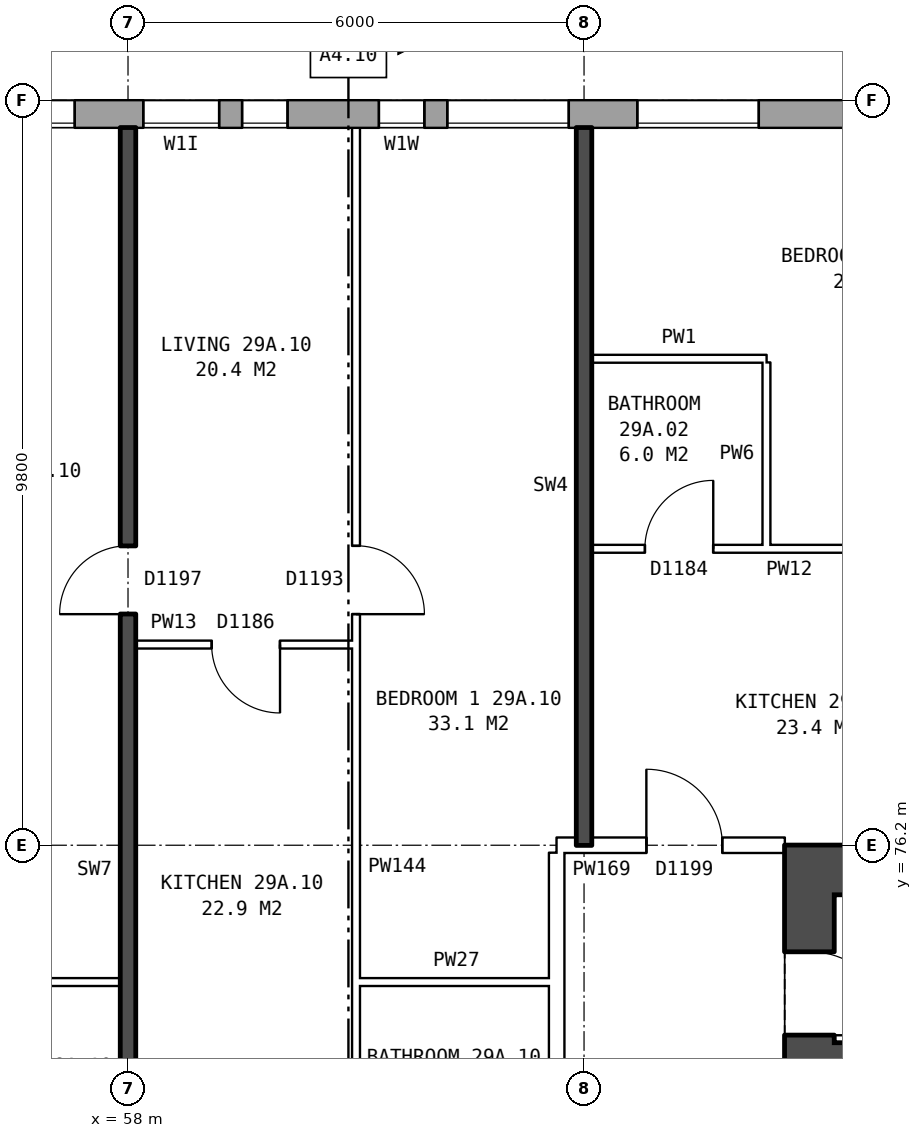
"""IFC4 building model, lengths in metres.
Left out: names, types, materials, properties, quantities, classifications, styles, units other than length and angle.
Written with IfcOpenShell. Run it as: python <this file> out.ifc"""

import sys

from ifc_helpers import new_model, si_unit, direction, frame, frame_2d, origin, place, context, subcontext, project, spatial, rectangle, extrude, element, fill, save


model = new_model("IFC4")
c1 = context("Model", 3, precision=1e-05, world=origin(), true_north=direction((0.0, 1.0)))
c2 = subcontext(c1, "Body", "Model", "MODEL_VIEW")
j1 = project(units=[si_unit("LENGTHUNIT", "METRE"), si_unit("PLANEANGLEUNIT", "RADIAN")], contexts=[c1])
p1 = place(None, origin())
s1 = spatial("IfcSite", under=j1, at=p1, CompositionType="ELEMENT")
p2 = place(p1, origin())
s2 = spatial("IfcBuilding", under=s1, at=p2, CompositionType="ELEMENT")
p3 = place(p2, frame((0.0, 0.0, 105.7)))
s3 = spatial("IfcBuildingStorey", under=s2, at=p3, CompositionType="ELEMENT", Elevation=105.7)
p4 = place(p3, frame((72.925, 85.82, 0.0), z_axis=(0.0, 0.0, 1.0), x_axis=(-1.0, 0.0, 0.0)))
e1 = element("IfcWall", 1, at=p4, inside=s3, PredefinedType="STANDARD", context=c2, shape_type="SweptSolid", body=[
    extrude(rectangle(XDim=44.851, YDim=0.36, at=frame_2d((22.425, 0.0))), origin(), (0.0, 0.0, 1.0), 2.85),
])
p5 = place(p4, frame((0.625, 0.0, 0.8)))
e2 = element("IfcOpeningElement", 2, at=p5, cuts=e1, PredefinedType="OPENING", context=c2, shape_type="SweptSolid", body=[
    extrude(rectangle(XDim=1.6, YDim=1.8, at=frame_2d((0.8, 0.9))), frame((0.0, 0.19, 0.0), z_axis=(0.0, -1.0, 0.0), x_axis=(1.0, 0.0, 0.0)), (0.0, 0.0, 1.0), 0.38),
])
p6 = place(p4, frame((3.625, 0.0, 0.8)))
e3 = element("IfcOpeningElement", 3, at=p6, cuts=e1, PredefinedType="OPENING", context=c2, shape_type="SweptSolid", body=[
    extrude(rectangle(XDim=1.6, YDim=1.8, at=frame_2d((0.8, 0.9))), frame((0.0, 0.19, 0.0), z_axis=(0.0, -1.0, 0.0), x_axis=(1.0, 0.0, 0.0)), (0.0, 0.0, 1.0), 0.38),
])
p7 = place(p4, frame((6.625, 0.0, 0.8)))
e4 = element("IfcOpeningElement", 4, at=p7, cuts=e1, PredefinedType="OPENING", context=c2, shape_type="SweptSolid", body=[
    extrude(rectangle(XDim=1.6, YDim=1.8, at=frame_2d((0.8, 0.9))), frame((0.0, 0.19, 0.0), z_axis=(0.0, -1.0, 0.0), x_axis=(1.0, 0.0, 0.0)), (0.0, 0.0, 1.0), 0.38),
])
p8 = place(p4, frame((9.125, 0.0, 0.8)))
e5 = element("IfcOpeningElement", 5, at=p8, cuts=e1, PredefinedType="OPENING", context=c2, shape_type="SweptSolid", body=[
    extrude(rectangle(XDim=1.6, YDim=1.8, at=frame_2d((0.8, 0.9))), frame((0.0, 0.19, 0.0), z_axis=(0.0, -1.0, 0.0), x_axis=(1.0, 0.0, 0.0)), (0.0, 0.0, 1.0), 0.38),
])
p9 = place(p4, frame((12.825, 0.0, 0.55)))
e6 = element("IfcOpeningElement", 6, at=p9, cuts=e1, PredefinedType="OPENING", context=c2, shape_type="SweptSolid", body=[
    extrude(rectangle(XDim=0.6, YDim=0.9, at=frame_2d((0.3, 0.45))), frame((0.0, 0.19, 0.0), z_axis=(0.0, -1.0, 0.0), x_axis=(1.0, 0.0, 0.0)), (0.0, 0.0, 1.0), 0.38),
])
p10 = place(p4, frame((15.625, 0.0, 0.8)))
e7 = element("IfcOpeningElement", 7, at=p10, cuts=e1, PredefinedType="OPENING", context=c2, shape_type="SweptSolid", body=[
    extrude(rectangle(XDim=1.6, YDim=1.8, at=frame_2d((0.8, 0.9))), frame((0.0, 0.19, 0.0), z_axis=(0.0, -1.0, 0.0), x_axis=(1.0, 0.0, 0.0)), (0.0, 0.0, 1.0), 0.38),
])
p11 = place(p4, frame((18.625, 0.0, 0.8)))
e8 = element("IfcOpeningElement", 8, at=p11, cuts=e1, PredefinedType="OPENING", context=c2, shape_type="SweptSolid", body=[
    extrude(rectangle(XDim=1.6, YDim=1.8, at=frame_2d((0.8, 0.9))), frame((0.0, 0.19, 0.0), z_axis=(0.0, -1.0, 0.0), x_axis=(1.0, 0.0, 0.0)), (0.0, 0.0, 1.0), 0.38),
])
p12 = place(p4, frame((21.625, 0.0, 0.8)))
e9 = element("IfcOpeningElement", 9, at=p12, cuts=e1, PredefinedType="OPENING", context=c2, shape_type="SweptSolid", body=[
    extrude(rectangle(XDim=1.6, YDim=1.8, at=frame_2d((0.8, 0.9))), frame((0.0, 0.19, 0.0), z_axis=(0.0, -1.0, 0.0), x_axis=(1.0, 0.0, 0.0)), (0.0, 0.0, 1.0), 0.38),
])
p13 = place(p4, frame((24.625, 0.0, 0.8)))
e10 = element("IfcOpeningElement", 10, at=p13, cuts=e1, PredefinedType="OPENING", context=c2, shape_type="SweptSolid", body=[
    extrude(rectangle(XDim=1.6, YDim=1.8, at=frame_2d((0.8, 0.9))), frame((0.0, 0.19, 0.0), z_axis=(0.0, -1.0, 0.0), x_axis=(1.0, 0.0, 0.0)), (0.0, 0.0, 1.0), 0.38),
])
p14 = place(p4, frame((27.625, 0.0, 0.8)))
e11 = element("IfcOpeningElement", 11, at=p14, cuts=e1, PredefinedType="OPENING", context=c2, shape_type="SweptSolid", body=[
    extrude(rectangle(XDim=1.6, YDim=1.8, at=frame_2d((0.8, 0.9))), frame((0.0, 0.19, 0.0), z_axis=(0.0, -1.0, 0.0), x_axis=(1.0, 0.0, 0.0)), (0.0, 0.0, 1.0), 0.38),
])
p15 = place(p4, frame((29.525, 0.0, 0.8)))
e12 = element("IfcOpeningElement", 12, at=p15, cuts=e1, PredefinedType="OPENING", context=c2, shape_type="SweptSolid", body=[
    extrude(rectangle(XDim=0.8, YDim=1.8, at=frame_2d((0.4, 0.9))), frame((0.0, 0.19, 0.0), z_axis=(0.0, -1.0, 0.0), x_axis=(1.0, 0.0, 0.0)), (0.0, 0.0, 1.0), 0.38),
])
p16 = place(p4, frame((33.325, 0.0, 1.4)))
e13 = element("IfcOpeningElement", 13, at=p16, cuts=e1, PredefinedType="OPENING", context=c2, shape_type="SweptSolid", body=[
    extrude(rectangle(XDim=1.0, YDim=1.2, at=frame_2d((0.5, 0.6))), frame((0.0, 0.19, 0.0), z_axis=(0.0, -1.0, 0.0), x_axis=(1.0, 0.0, 0.0)), (0.0, 0.0, 1.0), 0.38),
])
p17 = place(p4, frame((36.625, 0.0, 0.8)))
e14 = element("IfcOpeningElement", 14, at=p17, cuts=e1, PredefinedType="OPENING", context=c2, shape_type="SweptSolid", body=[
    extrude(rectangle(XDim=1.6, YDim=1.8, at=frame_2d((0.8, 0.9))), frame((0.0, 0.19, 0.0), z_axis=(0.0, -1.0, 0.0), x_axis=(1.0, 0.0, 0.0)), (0.0, 0.0, 1.0), 0.38),
])
p18 = place(p4, frame((39.625, 0.0, 0.8)))
e15 = element("IfcOpeningElement", 15, at=p18, cuts=e1, PredefinedType="OPENING", context=c2, shape_type="SweptSolid", body=[
    extrude(rectangle(XDim=1.6, YDim=1.8, at=frame_2d((0.8, 0.9))), frame((0.0, 0.19, 0.0), z_axis=(0.0, -1.0, 0.0), x_axis=(1.0, 0.0, 0.0)), (0.0, 0.0, 1.0), 0.38),
])
p19 = place(p4, frame((42.625, 0.0, 0.8)))
e16 = element("IfcOpeningElement", 16, at=p19, cuts=e1, PredefinedType="OPENING", context=c2, shape_type="SweptSolid", body=[
    extrude(rectangle(XDim=1.6, YDim=1.8, at=frame_2d((0.8, 0.9))), frame((0.0, 0.19, 0.0), z_axis=(0.0, -1.0, 0.0), x_axis=(1.0, 0.0, 0.0)), (0.0, 0.0, 1.0), 0.38),
])
p20 = place(p4, frame((11.025, 0.0, 1.5)))
e17 = element("IfcOpeningElement", 17, at=p20, cuts=e1, PredefinedType="OPENING", context=c2, shape_type="SweptSolid", body=[
    extrude(rectangle(XDim=0.6, YDim=0.9, at=frame_2d((0.3, 0.45))), frame((0.0, 0.19, 0.0), z_axis=(0.0, -1.0, 0.0), x_axis=(1.0, 0.0, 0.0)), (0.0, 0.0, 1.0), 0.38),
])
p21 = place(p4, frame((13.725, 0.0, 0.55)))
e18 = element("IfcOpeningElement", 18, at=p21, cuts=e1, PredefinedType="OPENING", context=c2, shape_type="SweptSolid", body=[
    extrude(rectangle(XDim=1.0, YDim=1.5, at=frame_2d((0.5, 0.75))), frame((0.0, 0.19, 0.0), z_axis=(0.0, -1.0, 0.0), x_axis=(1.0, 0.0, 0.0)), (0.0, 0.0, 1.0), 0.38),
])
p22 = place(p4, frame((30.625, 0.0, 0.8)))
e19 = element("IfcOpeningElement", 19, at=p22, cuts=e1, PredefinedType="OPENING", context=c2, shape_type="SweptSolid", body=[
    extrude(rectangle(XDim=1.0, YDim=0.9, at=frame_2d((0.5, 0.45))), frame((0.0, 0.19, 0.0), z_axis=(0.0, -1.0, 0.0), x_axis=(1.0, 0.0, 0.0)), (0.0, 0.0, 1.0), 0.38),
])
p23 = place(p4, frame((34.625, 0.0, 0.8)))
e20 = element("IfcOpeningElement", 20, at=p23, cuts=e1, PredefinedType="OPENING", context=c2, shape_type="SweptSolid", body=[
    extrude(rectangle(XDim=1.4, YDim=1.8, at=frame_2d((0.7, 0.9))), frame((0.0, 0.19, 0.0), z_axis=(0.0, -1.0, 0.0), x_axis=(1.0, 0.0, 0.0)), (0.0, 0.0, 1.0), 0.38),
])
p24 = place(p3, frame((66.965, 64.45, 0.0), z_axis=(0.0, 0.0, 1.0), x_axis=(0.0, 1.0, 0.0)))
e21 = element("IfcWall", 21, at=p24, inside=s3, PredefinedType="SHEAR", context=c2, shape_type="SweptSolid", body=[
    extrude(rectangle(XDim=11.1, YDim=0.65, at=frame_2d((5.55, 0.0))), origin(), (0.0, 0.0, 1.0), 2.85),
])
p25 = place(p24, frame((0.675, 0.0, 0.0)))
e22 = element("IfcOpeningElement", 22, at=p25, cuts=e21, PredefinedType="OPENING", context=c2, shape_type="SweptSolid", body=[
    extrude(rectangle(XDim=1.1, YDim=2.1, at=frame_2d((0.55, 1.05))), frame((0.0, 0.335, 0.0), z_axis=(0.0, -1.0, 0.0), x_axis=(1.0, 0.0, 0.0)), (0.0, 0.0, 1.0), 0.67),
])
p26 = place(p24, frame((9.25, 0.0, 0.0)))
e23 = element("IfcOpeningElement", 23, at=p26, cuts=e21, PredefinedType="OPENING", context=c2, shape_type="SweptSolid", body=[
    extrude(rectangle(XDim=1.1, YDim=2.1, at=frame_2d((0.55, 1.05))), frame((0.0, 0.335, 0.0), z_axis=(0.0, -1.0, 0.0), x_axis=(1.0, 0.0, 0.0)), (0.0, 0.0, 1.0), 0.67),
])
p27 = place(p3, frame((66.64, 75.875, 0.0), z_axis=(0.0, 0.0, 1.0), x_axis=(1.0, 0.0, 0.0)))
e24 = element("IfcWall", 24, at=p27, inside=s3, PredefinedType="SHEAR", context=c2, shape_type="SweptSolid", body=[
    extrude(rectangle(XDim=9.0, YDim=0.65, at=frame_2d((4.5, 0.0))), origin(), (0.0, 0.0, 1.0), 2.85),
])
p28 = place(p3, frame((67.29, 73.45, 0.0), z_axis=(0.0, 0.0, 1.0), x_axis=(1.0, 0.0, 0.0)))
e25 = element("IfcWall", 25, at=p28, inside=s3, PredefinedType="SHEAR", context=c2, shape_type="SweptSolid", body=[
    extrude(rectangle(XDim=2.25, YDim=0.3, at=frame_2d((1.125, 0.0))), origin(), (0.0, 0.0, 1.0), 2.85),
])
p29 = place(p3, frame((63.64, 63.9, 0.0), z_axis=(0.0, 0.0, 1.0), x_axis=(0.0, 1.0, 0.0)))
e26 = element("IfcWall", 26, at=p29, inside=s3, PredefinedType="PARTITIONING", context=c2, shape_type="SweptSolid", body=[
    extrude(rectangle(XDim=12.2, YDim=0.2, at=frame_2d((6.1, 0.0))), origin(), (0.0, 0.0, 1.0), 2.85),
])
p30 = place(p29, frame((5.1, 0.0, 0.0)))
e27 = element("IfcOpeningElement", 27, at=p30, cuts=e26, PredefinedType="OPENING", context=c2, shape_type="SweptSolid", body=[
    extrude(rectangle(XDim=2.0, YDim=2.1, at=frame_2d((1.0, 1.05))), frame((0.0, 0.11, 0.0), z_axis=(0.0, -1.0, 0.0), x_axis=(1.0, 0.0, 0.0)), (0.0, 0.0, 1.0), 0.22),
])
p31 = place(p3, frame((55.1, 74.4, 0.0), z_axis=(0.0, 0.0, 1.0), x_axis=(1.0, 0.0, 0.0)))
e28 = element("IfcWall", 28, at=p31, inside=s3, PredefinedType="PARTITIONING", context=c2, shape_type="SweptSolid", body=[
    extrude(rectangle(XDim=2.8, YDim=0.1, at=frame_2d((1.4, 0.0))), origin(), (0.0, 0.0, 1.0), 2.85),
])
p32 = place(p3, frame((61.0, 74.4, 0.0), z_axis=(0.0, 0.0, 1.0), x_axis=(1.0, 0.0, 0.0)))
e29 = element("IfcWall", 29, at=p32, inside=s3, PredefinedType="PARTITIONING", context=c2, shape_type="SweptSolid", body=[
    extrude(rectangle(XDim=2.64, YDim=0.1, at=frame_2d((1.32, 0.0))), origin(), (0.0, 0.0, 1.0), 2.85),
])
p33 = place(p3, frame((63.64, 76.2, 0.0), z_axis=(0.0, 0.0, 1.0), x_axis=(1.0, 0.0, 0.0)))
e30 = element("IfcWall", 30, at=p33, inside=s3, PredefinedType="PARTITIONING", context=c2, shape_type="SweptSolid", body=[
    extrude(rectangle(XDim=3.0, YDim=0.2, at=frame_2d((1.5, 0.0))), origin(), (0.0, 0.0, 1.0), 2.85),
])
p34 = place(p33, frame((1.18, 0.0, 0.0)))
e31 = element("IfcOpeningElement", 31, at=p34, cuts=e30, PredefinedType="OPENING", context=c2, shape_type="SweptSolid", body=[
    extrude(rectangle(XDim=1.0, YDim=2.1, at=frame_2d((0.5, 1.05))), frame((0.0, 0.11, 0.0), z_axis=(0.0, -1.0, 0.0), x_axis=(1.0, 0.0, 0.0)), (0.0, 0.0, 1.0), 0.22),
])
p35 = place(p3, frame((58.1, 78.84, 0.0), z_axis=(0.0, 0.0, 1.0), x_axis=(1.0, 0.0, 0.0)))
e32 = element("IfcWall", 32, at=p35, inside=s3, PredefinedType="PARTITIONING", context=c2, shape_type="SweptSolid", body=[
    extrude(rectangle(XDim=2.9, YDim=0.1, at=frame_2d((1.45, 0.0))), origin(), (0.0, 0.0, 1.0), 2.85),
])
p36 = place(p35, frame((1.0, 0.0, 0.0)))
e33 = element("IfcOpeningElement", 33, at=p36, cuts=e32, PredefinedType="OPENING", context=c2, shape_type="SweptSolid", body=[
    extrude(rectangle(XDim=0.9, YDim=2.1, at=frame_2d((0.45, 1.05))), frame((0.0, 0.06, 0.0), z_axis=(0.0, -1.0, 0.0), x_axis=(1.0, 0.0, 0.0)), (0.0, 0.0, 1.0), 0.12),
])
p37 = place(p3, frame((64.1, 80.1, 0.0), z_axis=(0.0, 0.0, 1.0), x_axis=(1.0, 0.0, 0.0)))
e34 = element("IfcWall", 34, at=p37, inside=s3, PredefinedType="PARTITIONING", context=c2, shape_type="SweptSolid", body=[
    extrude(rectangle(XDim=5.8, YDim=0.1, at=frame_2d((2.9, 0.0))), origin(), (0.0, 0.0, 1.0), 2.85),
])
p38 = place(p37, frame((3.6, 0.0, 0.0)))
e35 = element("IfcOpeningElement", 35, at=p38, cuts=e34, PredefinedType="OPENING", context=c2, shape_type="SweptSolid", body=[
    extrude(rectangle(XDim=0.9, YDim=2.1, at=frame_2d((0.45, 1.05))), frame((0.0, 0.06, 0.0), z_axis=(0.0, -1.0, 0.0), x_axis=(1.0, 0.0, 0.0)), (0.0, 0.0, 1.0), 0.12),
])
p39 = place(p37, frame((0.7, 0.0, 0.0)))
e36 = element("IfcOpeningElement", 36, at=p39, cuts=e34, PredefinedType="OPENING", context=c2, shape_type="SweptSolid", body=[
    extrude(rectangle(XDim=0.9, YDim=2.1, at=frame_2d((0.45, 1.05))), frame((0.0, 0.06, 0.0), z_axis=(0.0, -1.0, 0.0), x_axis=(1.0, 0.0, 0.0)), (0.0, 0.0, 1.0), 0.12),
])
p40 = place(p3, frame((64.1, 82.6, 0.0), z_axis=(0.0, 0.0, 1.0), x_axis=(1.0, 0.0, 0.0)))
e37 = element("IfcWall", 37, at=p40, inside=s3, PredefinedType="PARTITIONING", context=c2, shape_type="SweptSolid", body=[
    extrude(rectangle(XDim=2.3, YDim=0.1, at=frame_2d((1.15, 0.0))), origin(), (0.0, 0.0, 1.0), 2.85),
])
p41 = place(p3, frame((58.0, 71.2, 0.0), z_axis=(0.0, 0.0, 1.0), x_axis=(0.0, 1.0, 0.0)))
e38 = element("IfcWall", 38, at=p41, inside=s3, PredefinedType="SOLIDWALL", context=c2, shape_type="SweptSolid", body=[
    extrude(rectangle(XDim=14.44, YDim=0.2, at=frame_2d((7.22, 0.0))), origin(), (0.0, 0.0, 1.0), 2.85),
])
p42 = place(p41, frame((8.04, 0.0, 0.0)))
e39 = element("IfcOpeningElement", 39, at=p42, cuts=e38, PredefinedType="OPENING", context=c2, shape_type="SweptSolid", body=[
    extrude(rectangle(XDim=0.9, YDim=2.1, at=frame_2d((0.45, 1.05))), frame((0.0, 0.11, 0.0), z_axis=(0.0, -1.0, 0.0), x_axis=(1.0, 0.0, 0.0)), (0.0, 0.0, 1.0), 0.22),
])
p43 = place(p41, frame((0.4, 0.0, 0.0)))
e40 = element("IfcOpeningElement", 40, at=p43, cuts=e38, PredefinedType="OPENING", context=c2, shape_type="SweptSolid", body=[
    extrude(rectangle(XDim=0.9, YDim=2.1, at=frame_2d((0.45, 1.05))), frame((0.0, 0.11, 0.0), z_axis=(0.0, -1.0, 0.0), x_axis=(1.0, 0.0, 0.0)), (0.0, 0.0, 1.0), 0.22),
])
p44 = place(p3, frame((61.0, 71.3, 0.0), z_axis=(0.0, 0.0, 1.0), x_axis=(0.0, 1.0, 0.0)))
e41 = element("IfcWall", 41, at=p44, inside=s3, PredefinedType="PARTITIONING", context=c2, shape_type="SweptSolid", body=[
    extrude(rectangle(XDim=14.34, YDim=0.1, at=frame_2d((7.17, 0.0))), origin(), (0.0, 0.0, 1.0), 2.85),
])
p45 = place(p44, frame((7.94, 0.0, 0.0)))
e42 = element("IfcOpeningElement", 42, at=p45, cuts=e41, PredefinedType="OPENING", context=c2, shape_type="SweptSolid", body=[
    extrude(rectangle(XDim=0.9, YDim=2.1, at=frame_2d((0.45, 1.05))), frame((0.0, 0.06, 0.0), z_axis=(0.0, -1.0, 0.0), x_axis=(1.0, 0.0, 0.0)), (0.0, 0.0, 1.0), 0.12),
])
p46 = place(p44, frame((0.4, 0.0, 0.0)))
e43 = element("IfcOpeningElement", 43, at=p46, cuts=e41, PredefinedType="OPENING", context=c2, shape_type="SweptSolid", body=[
    extrude(rectangle(XDim=0.9, YDim=2.1, at=frame_2d((0.45, 1.05))), frame((0.0, 0.06, 0.0), z_axis=(0.0, -1.0, 0.0), x_axis=(1.0, 0.0, 0.0)), (0.0, 0.0, 1.0), 0.12),
])
p47 = place(p3, frame((64.0, 76.2, 0.0), z_axis=(0.0, 0.0, 1.0), x_axis=(0.0, 1.0, 0.0)))
e44 = element("IfcWall", 44, at=p47, inside=s3, PredefinedType="SOLIDWALL", context=c2, shape_type="SweptSolid", body=[
    extrude(rectangle(XDim=9.44, YDim=0.2, at=frame_2d((4.72, 0.0))), origin(), (0.0, 0.0, 1.0), 2.85),
])
p48 = place(p3, frame((66.4, 80.15, 0.0), z_axis=(0.0, 0.0, 1.0), x_axis=(0.0, 1.0, 0.0)))
e45 = element("IfcWall", 45, at=p48, inside=s3, PredefinedType="PARTITIONING", context=c2, shape_type="SweptSolid", body=[
    extrude(rectangle(XDim=2.4, YDim=0.1, at=frame_2d((1.2, 0.0))), origin(), (0.0, 0.0, 1.0), 2.85),
])
p49 = place(p7, origin())
e46 = element("IfcWindow", 46, at=p49, inside=s3, PartitioningType="SINGLE_PANEL", PredefinedType="WINDOW", context=c2, shape_type="SweptSolid", body=[
    extrude(rectangle(XDim=1.6, YDim=1.8, at=frame_2d((0.8, 0.9))), frame((0.0, 0.15, 0.0), z_axis=(0.0, -1.0, 0.0), x_axis=(1.0, 0.0, 0.0)), (0.0, 0.0, 1.0), 0.06),
])
fill(e4, e46)
p50 = place(p8, origin())
e47 = element("IfcWindow", 47, at=p50, inside=s3, PartitioningType="SINGLE_PANEL", PredefinedType="WINDOW", context=c2, shape_type="SweptSolid", body=[
    extrude(rectangle(XDim=1.6, YDim=1.8, at=frame_2d((0.8, 0.9))), frame((0.0, 0.15, 0.0), z_axis=(0.0, -1.0, 0.0), x_axis=(1.0, 0.0, 0.0)), (0.0, 0.0, 1.0), 0.06),
])
fill(e5, e47)
p51 = place(p9, origin())
e48 = element("IfcWindow", 48, at=p51, inside=s3, PartitioningType="SINGLE_PANEL", PredefinedType="WINDOW", context=c2, shape_type="SweptSolid", body=[
    extrude(rectangle(XDim=0.6, YDim=0.9, at=frame_2d((0.3, 0.45))), frame((0.0, 0.15, 0.0), z_axis=(0.0, -1.0, 0.0), x_axis=(1.0, 0.0, 0.0)), (0.0, 0.0, 1.0), 0.06),
])
fill(e6, e48)
p52 = place(p10, origin())
e49 = element("IfcWindow", 49, at=p52, inside=s3, PartitioningType="SINGLE_PANEL", PredefinedType="WINDOW", context=c2, shape_type="SweptSolid", body=[
    extrude(rectangle(XDim=1.6, YDim=1.8, at=frame_2d((0.8, 0.9))), frame((0.0, 0.15, 0.0), z_axis=(0.0, -1.0, 0.0), x_axis=(1.0, 0.0, 0.0)), (0.0, 0.0, 1.0), 0.06),
])
fill(e7, e49)
p53 = place(p26, frame((1.1, 0.0, 0.0), z_axis=(0.0, 0.0, 1.0), x_axis=(-1.0, 0.0, 0.0)))
e50 = element("IfcDoor", 50, at=p53, inside=s3, OperationType="SINGLE_SWING_RIGHT", PredefinedType="DOOR", context=c2, shape_type="SweptSolid", body=[
    extrude(rectangle(XDim=1.1, YDim=2.1, at=frame_2d((0.55, 1.05))), frame((0.0, 0.31, 0.0), z_axis=(0.0, -1.0, 0.0), x_axis=(1.0, 0.0, 0.0)), (0.0, 0.0, 1.0), 0.05),
])
fill(e23, e50)
p54 = place(p34, origin())
e51 = element("IfcDoor", 51, at=p54, inside=s3, OperationType="SINGLE_SWING_LEFT", PredefinedType="DOOR", context=c2, shape_type="SweptSolid", body=[
    extrude(rectangle(XDim=1.0, YDim=2.1, at=frame_2d((0.5, 1.05))), frame((0.0, 0.025, 0.0), z_axis=(0.0, -1.0, 0.0), x_axis=(1.0, 0.0, 0.0)), (0.0, 0.0, 1.0), 0.05),
])
fill(e31, e51)
p55 = place(p39, origin())
e52 = element("IfcDoor", 52, at=p55, inside=s3, OperationType="SINGLE_SWING_RIGHT", PredefinedType="DOOR", context=c2, shape_type="SweptSolid", body=[
    extrude(rectangle(XDim=0.9, YDim=2.1, at=frame_2d((0.45, 1.05))), frame((0.0, 0.025, 0.0), z_axis=(0.0, -1.0, 0.0), x_axis=(1.0, 0.0, 0.0)), (0.0, 0.0, 1.0), 0.05),
])
fill(e36, e52)
p56 = place(p45, frame((0.9, 0.0, 0.0), z_axis=(0.0, 0.0, 1.0), x_axis=(-1.0, 0.0, 0.0)))
e53 = element("IfcDoor", 53, at=p56, inside=s3, OperationType="SINGLE_SWING_RIGHT", PredefinedType="DOOR", context=c2, shape_type="SweptSolid", body=[
    extrude(rectangle(XDim=0.9, YDim=2.1, at=frame_2d((0.45, 1.05))), frame((0.0, 0.025, 0.0), z_axis=(0.0, -1.0, 0.0), x_axis=(1.0, 0.0, 0.0)), (0.0, 0.0, 1.0), 0.05),
])
fill(e42, e53)
p57 = place(p42, origin())
e54 = element("IfcDoor", 54, at=p57, inside=s3, OperationType="SINGLE_SWING_LEFT", PredefinedType="DOOR", context=c2, shape_type="SweptSolid", body=[
    extrude(rectangle(XDim=0.9, YDim=2.1, at=frame_2d((0.45, 1.05))), frame((0.0, 0.025, 0.0), z_axis=(0.0, -1.0, 0.0), x_axis=(1.0, 0.0, 0.0)), (0.0, 0.0, 1.0), 0.05),
])
fill(e39, e54)
p58 = place(p36, frame((0.9, 0.0, 0.0), z_axis=(0.0, 0.0, 1.0), x_axis=(-1.0, 0.0, 0.0)))
e55 = element("IfcDoor", 55, at=p58, inside=s3, OperationType="SINGLE_SWING_LEFT", PredefinedType="DOOR", context=c2, shape_type="SweptSolid", body=[
    extrude(rectangle(XDim=0.9, YDim=2.1, at=frame_2d((0.45, 1.05))), frame((0.0, 0.025, 0.0), z_axis=(0.0, -1.0, 0.0), x_axis=(1.0, 0.0, 0.0)), (0.0, 0.0, 1.0), 0.05),
])
fill(e33, e55)
p59 = place(p20, origin())
e56 = element("IfcWindow", 56, at=p59, inside=s3, PartitioningType="SINGLE_PANEL", PredefinedType="WINDOW", context=c2, shape_type="SweptSolid", body=[
    extrude(rectangle(XDim=0.6, YDim=0.9, at=frame_2d((0.3, 0.45))), frame((0.0, 0.15, 0.0), z_axis=(0.0, -1.0, 0.0), x_axis=(1.0, 0.0, 0.0)), (0.0, 0.0, 1.0), 0.06),
])
fill(e17, e56)
p60 = place(p21, origin())
e57 = element("IfcWindow", 57, at=p60, inside=s3, PartitioningType="SINGLE_PANEL", PredefinedType="WINDOW", context=c2, shape_type="SweptSolid", body=[
    extrude(rectangle(XDim=1.0, YDim=1.5, at=frame_2d((0.5, 0.75))), frame((0.0, 0.15, 0.0), z_axis=(0.0, -1.0, 0.0), x_axis=(1.0, 0.0, 0.0)), (0.0, 0.0, 1.0), 0.06),
])
fill(e18, e57)
save(model, sys.argv[1])
